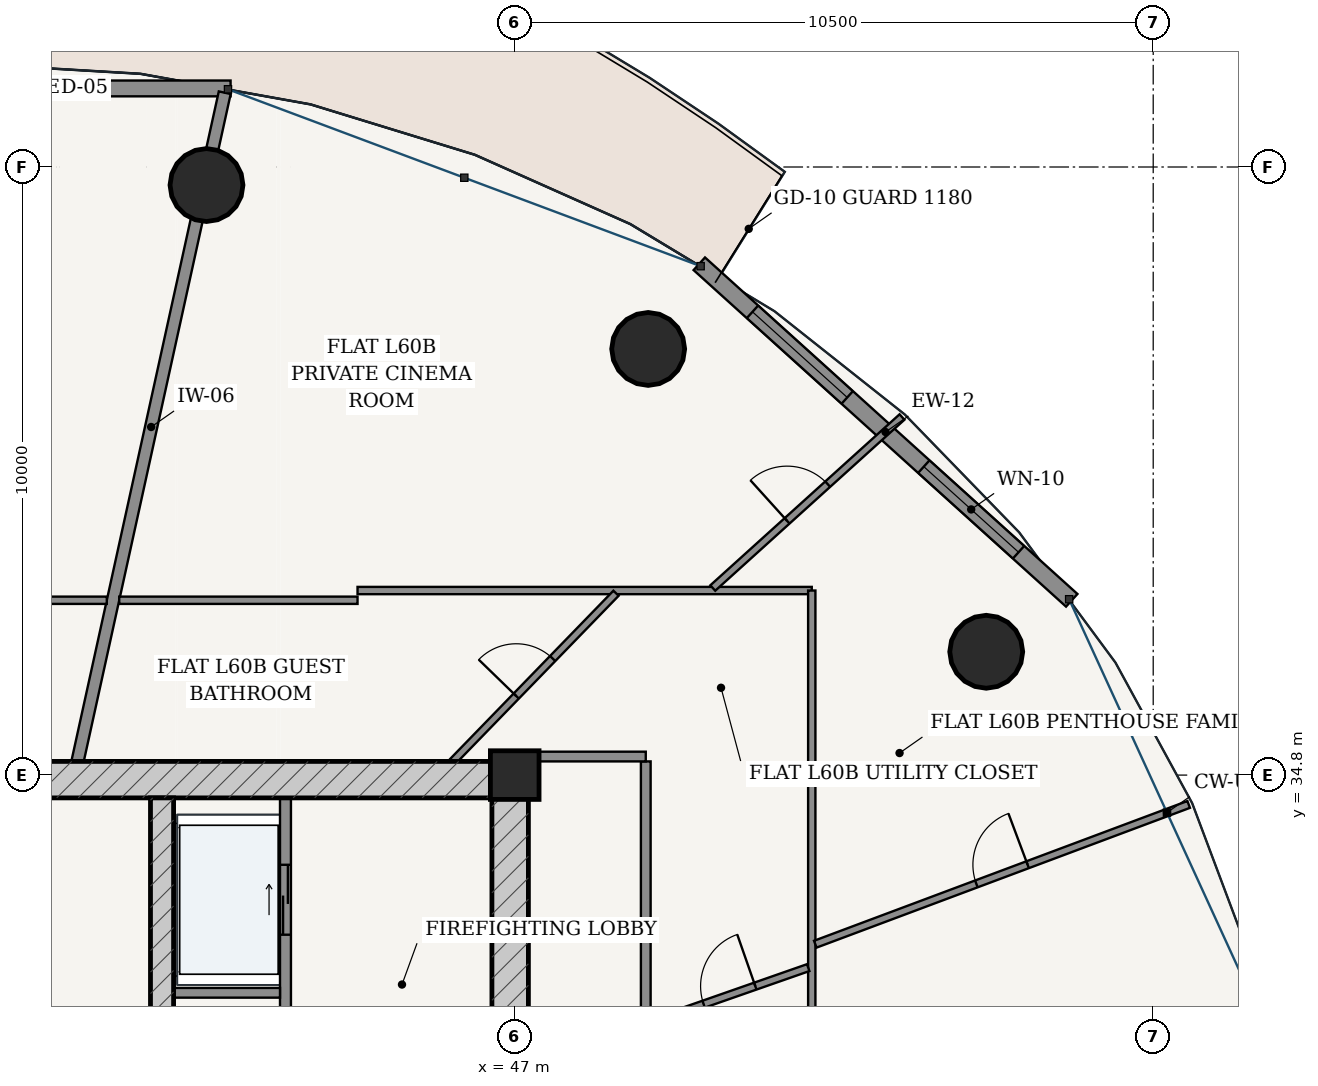
"""IFC4 building model, lengths in metres.
Left out: names, types, materials, properties, quantities, classifications, styles, units other than length and angle.
Written with IfcOpenShell. Run it as: python <this file> out.ifc"""

import sys

from ifc_helpers import new_model, si_unit, direction, frame, frame_2d, origin, origin_2d, place, context, subcontext, project, spatial, rectangle, hollow_circle, extrude, source, transform, mapped, element, fill, save


model = new_model("IFC4")
c1 = context("Model", 3, precision=1e-05, world=origin(), true_north=direction((-0.2419218956, 0.970295726276)))
c2 = subcontext(c1, "Body", "Model", "MODEL_VIEW")
j1 = project(units=[si_unit("LENGTHUNIT", "METRE"), si_unit("PLANEANGLEUNIT", "RADIAN")], contexts=[c1])
p1 = place(None, origin())
s1 = spatial("IfcSite", under=j1, at=p1, CompositionType="ELEMENT")
p2 = place(p1, origin())
s2 = spatial("IfcBuilding", under=s1, at=p2, CompositionType="ELEMENT")
p3 = place(p2, frame((0.0, 0.0, 228.2)))
s3 = spatial("IfcBuildingStorey", under=s2, at=p3, CompositionType="ELEMENT", Elevation=228.2)
p4 = place(p3, frame((47.0, 34.8, 0.0), z_axis=(0.0, 0.0, 1.0), x_axis=(1.0, 0.0, 0.0)))
e1 = element("IfcColumn", 1, at=p4, inside=s3, PredefinedType="COLUMN", context=c2, shape_type="SweptSolid", body=[
    extrude(rectangle(XDim=0.8, YDim=0.8, at=origin_2d()), origin(), (0.0, 0.0, 1.0), 3.7),
])
p5 = place(p3, frame((28.775, 34.725, 0.0), z_axis=(0.0, 0.0, 1.0), x_axis=(1.0, 0.0, 0.0)))
e2 = element("IfcWall", 2, at=p5, inside=s3, PredefinedType="SHEAR", context=c2, shape_type="SweptSolid", body=[
    extrude(rectangle(XDim=18.45, YDim=0.6, at=frame_2d((9.225, 0.0))), origin(), (0.0, 0.0, 1.0), 3.435),
])
p6 = place(p3, frame((46.925, 19.175, 0.0), z_axis=(0.0, 0.0, 1.0), x_axis=(0.0, 1.0, 0.0)))
e3 = element("IfcWall", 3, at=p6, inside=s3, PredefinedType="SHEAR", context=c2, shape_type="SweptSolid", body=[
    extrude(rectangle(XDim=15.25, YDim=0.6, at=frame_2d((7.625, 0.0))), origin(), (0.0, 0.0, 1.0), 3.435),
])
p7 = place(p6, frame((9.875, 0.0, 0.0)))
e4 = element("IfcOpeningElement", 4, at=p7, cuts=e3, PredefinedType="OPENING", context=c2, shape_type="SweptSolid", body=[
    extrude(rectangle(XDim=1.5, YDim=2.2, at=frame_2d((0.75, 1.1))), frame((0.0, 0.31, 0.0), z_axis=(0.0, -1.0, 0.0), x_axis=(1.0, 0.0, 0.0)), (0.0, 0.0, 1.0), 0.62),
])
p8 = place(p3, frame((41.2, 19.175, 0.0), z_axis=(0.0, 0.0, 1.0), x_axis=(0.0, 1.0, 0.0)))
e5 = element("IfcWall", 5, at=p8, inside=s3, PredefinedType="SHEAR", context=c2, shape_type="SweptSolid", body=[
    extrude(rectangle(XDim=15.25, YDim=0.38, at=frame_2d((7.625, 0.0))), origin(), (0.0, 0.0, 1.0), 3.435),
])
p9 = place(p8, frame((7.8, 0.0, 0.0)))
e6 = element("IfcOpeningElement", 6, at=p9, cuts=e5, PredefinedType="OPENING", context=c2, shape_type="SweptSolid", body=[
    extrude(rectangle(XDim=1.05, YDim=2.15, at=frame_2d((0.525, 1.075))), frame((0.0, 0.2, 0.0), z_axis=(0.0, -1.0, 0.0), x_axis=(1.0, 0.0, 0.0)), (0.0, 0.0, 1.0), 0.4),
])
for number, where, z_axis, x_axis in (
    (7, (54.754, 36.828, 0.0), (0.0, 0.0, 1.0), (1.0, 0.0, 0.0)),
    (8, (49.195, 41.808, 0.0), (0.0, 0.0, 1.0), (1.0, 0.0, 0.0)),
    (9, (41.931, 44.503, 0.0), (0.0, 0.0, 1.0), (1.0, 0.0, 0.0)),
):
    element("IfcColumn", number, at=place(p3, frame(where, z_axis=z_axis, x_axis=x_axis)), inside=s3, PredefinedType="COLUMN", context=c2, shape_type="SweptSolid", body=[
        extrude(hollow_circle(Radius=0.6, WallThickness=0.038, at=origin_2d()), origin(), (0.0, 0.0, 1.0), 3.7),
    ])
p10 = place(p3, frame((56.16, 37.674, 0.0), z_axis=(0.0, 0.0, 1.0), x_axis=(-0.741972126783, 0.670430729514, 0.0)))
e10 = element("IfcWall", 10, at=p10, inside=s3, PredefinedType="SOLIDWALL", context=c2, shape_type="SweptSolid", body=[
    extrude(rectangle(XDim=8.255, YDim=0.28, at=frame_2d((4.127, 0.0))), origin(), (0.0, 0.0, 1.0), 3.435),
])
p11 = place(p10, frame((1.179, 0.0, 0.85)))
e11 = element("IfcOpeningElement", 11, at=p11, cuts=e10, PredefinedType="OPENING", context=c2, shape_type="SweptSolid", body=[
    extrude(rectangle(XDim=2.1, YDim=1.95, at=frame_2d((1.05, 0.975))), frame((0.0, 0.15, 0.0), z_axis=(0.0, -1.0, 0.0), x_axis=(1.0, 0.0, 0.0)), (0.0, 0.0, 1.0), 0.3),
])
p12 = place(p10, frame((4.976, 0.0, 0.85)))
e12 = element("IfcOpeningElement", 12, at=p12, cuts=e10, PredefinedType="OPENING", context=c2, shape_type="SweptSolid", body=[
    extrude(rectangle(XDim=2.1, YDim=1.95, at=frame_2d((1.05, 0.975))), frame((0.0, 0.15, 0.0), z_axis=(0.0, -1.0, 0.0), x_axis=(1.0, 0.0, 0.0)), (0.0, 0.0, 1.0), 0.3),
])
p13 = place(p3, frame((42.327, 46.092, 0.0), z_axis=(0.0, 0.0, 1.0), x_axis=(-1.0, 0.0, 0.0)))
e13 = element("IfcWall", 13, at=p13, inside=s3, PredefinedType="SOLIDWALL", context=c2, shape_type="SweptSolid", body=[
    extrude(rectangle(XDim=8.654, YDim=0.26, at=frame_2d((4.327, 0.0))), origin(), (0.0, 0.0, 1.0), 3.435),
])
p14 = place(p13, frame((3.652, 0.0, 0.0)))
e14 = element("IfcOpeningElement", 14, at=p14, cuts=e13, PredefinedType="OPENING", context=c2, shape_type="SweptSolid", body=[
    extrude(rectangle(XDim=1.35, YDim=2.2, at=frame_2d((0.675, 1.1))), frame((0.0, 0.14, 0.0), z_axis=(0.0, -1.0, 0.0), x_axis=(1.0, 0.0, 0.0)), (0.0, 0.0, 1.0), 0.28),
])
p15 = place(p3, frame((43.23, 28.52, 0.0), z_axis=(0.0, 0.0, 1.0), x_axis=(0.0, 1.0, 0.0)))
e15 = element("IfcWall", 15, at=p15, inside=s3, PredefinedType="PARTITIONING", context=c2, shape_type="SweptSolid", body=[
    extrude(rectangle(XDim=5.905, YDim=0.18, at=frame_2d((2.953, 0.0))), origin(), (0.0, 0.0, 1.0), 3.435),
])
p16 = place(p15, frame((0.905, 0.0, 0.0)))
e16 = element("IfcOpeningElement", 16, at=p16, cuts=e15, PredefinedType="OPENING", context=c2, shape_type="SweptSolid", body=[
    extrude(rectangle(XDim=0.85, YDim=2.1, at=frame_2d((0.425, 1.05))), frame((0.0, 0.1, 0.0), z_axis=(0.0, -1.0, 0.0), x_axis=(1.0, 0.0, 0.0)), (0.0, 0.0, 1.0), 0.2),
])
p17 = place(p15, frame((3.655, 0.0, 0.0)))
e17 = element("IfcOpeningElement", 17, at=p17, cuts=e15, PredefinedType="OPENING", context=c2, shape_type="SweptSolid", body=[
    extrude(rectangle(XDim=1.15, YDim=2.2, at=frame_2d((0.575, 1.1))), frame((0.0, 0.1, 0.0), z_axis=(0.0, -1.0, 0.0), x_axis=(1.0, 0.0, 0.0)), (0.0, 0.0, 1.0), 0.2),
])
p18 = place(p3, frame((41.39, 31.22, 0.0), z_axis=(0.0, 0.0, 1.0), x_axis=(1.0, 0.0, 0.0)))
e18 = element("IfcWall", 18, at=p18, inside=s3, PredefinedType="PARTITIONING", context=c2, shape_type="SweptSolid", body=[
    extrude(rectangle(XDim=1.75, YDim=0.16, at=frame_2d((0.875, 0.0))), origin(), (0.0, 0.0, 1.0), 3.435),
])
p19 = place(p3, frame((49.155, 16.725, 0.0), z_axis=(0.0, 0.0, 1.0), x_axis=(0.0, 1.0, 0.0)))
e19 = element("IfcWall", 19, at=p19, inside=s3, PredefinedType="PARTITIONING", context=c2, shape_type="SweptSolid", body=[
    extrude(rectangle(XDim=18.3, YDim=0.16, at=frame_2d((9.15, 0.0))), origin(), (0.0, 0.0, 1.0), 2.951),
])
p20 = place(p3, frame((47.225, 35.105, 0.0), z_axis=(0.0, 0.0, 1.0), x_axis=(1.0, 0.0, 0.0)))
e20 = element("IfcWall", 20, at=p20, inside=s3, PredefinedType="PARTITIONING", context=c2, shape_type="SweptSolid", body=[
    extrude(rectangle(XDim=1.93, YDim=0.16, at=frame_2d((0.965, 0.0))), origin(), (0.0, 0.0, 1.0), 3.435),
])
p21 = place(p3, frame((39.811, 35.027, 0.0), z_axis=(0.0, 0.0, 1.0), x_axis=(0.214966857327, 0.976621344356, 0.0)))
e21 = element("IfcWall", 21, at=p21, inside=s3, PredefinedType="PARTITIONING", context=c2, shape_type="SweptSolid", body=[
    extrude(rectangle(XDim=11.258, YDim=0.2, at=frame_2d((5.629, 0.0))), origin(), (0.0, 0.0, 1.0), 2.52),
])
p22 = place(p3, frame((31.585, 37.675, 0.0), z_axis=(0.0, 0.0, 1.0), x_axis=(1.0, 0.0, 0.0)))
e22 = element("IfcWall", 22, at=p22, inside=s3, PredefinedType="PARTITIONING", context=c2, shape_type="SweptSolid", body=[
    extrude(rectangle(XDim=8.707, YDim=0.12, at=frame_2d((4.354, 0.0))), origin(), (0.0, 0.0, 1.0), 2.951),
])
p23 = place(p22, frame((1.327, 0.0, 0.0)))
e23 = element("IfcOpeningElement", 23, at=p23, cuts=e22, PredefinedType="OPENING", context=c2, shape_type="SweptSolid", body=[
    extrude(rectangle(XDim=0.9, YDim=2.15, at=frame_2d((0.45, 1.075))), frame((0.0, 0.07, 0.0), z_axis=(0.0, -1.0, 0.0), x_axis=(1.0, 0.0, 0.0)), (0.0, 0.0, 1.0), 0.14),
])
p24 = place(p3, frame((40.496, 37.675, 0.0), z_axis=(0.0, 0.0, 1.0), x_axis=(1.0, 0.0, 0.0)))
e24 = element("IfcWall", 24, at=p24, inside=s3, PredefinedType="PARTITIONING", context=c2, shape_type="SweptSolid", body=[
    extrude(rectangle(XDim=3.919, YDim=0.12, at=frame_2d((1.959, 0.0))), origin(), (0.0, 0.0, 1.0), 2.951),
])
p25 = place(p3, frame((44.415, 37.835, 0.0), z_axis=(0.0, 0.0, 1.0), x_axis=(1.0, 0.0, 0.0)))
e25 = element("IfcWall", 25, at=p25, inside=s3, PredefinedType="PARTITIONING", context=c2, shape_type="SweptSolid", body=[
    extrude(rectangle(XDim=7.47, YDim=0.12, at=frame_2d((3.735, 0.0))), origin(), (0.0, 0.0, 1.0), 2.951),
])
p26 = place(p3, frame((51.885, 37.835, 0.0), z_axis=(0.0, 0.0, 1.0), x_axis=(0.0, -1.0, 0.0)))
e26 = element("IfcWall", 26, at=p26, inside=s3, PredefinedType="PARTITIONING", context=c2, shape_type="SweptSolid", body=[
    extrude(rectangle(XDim=23.92, YDim=0.12, at=frame_2d((11.96, 0.0))), origin(), (0.0, 0.0, 1.0), 2.951),
])
p27 = place(p26, frame((16.558, 0.0, 0.0)))
e27 = element("IfcOpeningElement", 27, at=p27, cuts=e26, PredefinedType="OPENING", context=c2, shape_type="SweptSolid", body=[
    extrude(rectangle(XDim=0.9, YDim=2.15, at=frame_2d((0.45, 1.075))), frame((0.0, 0.07, 0.0), z_axis=(0.0, -1.0, 0.0), x_axis=(1.0, 0.0, 0.0)), (0.0, 0.0, 1.0), 0.14),
])
p28 = place(p3, frame((51.943, 32.019, 0.0), z_axis=(0.0, 0.0, 1.0), x_axis=(0.936540194592, 0.350560214389, 0.0)))
e28 = element("IfcWall", 28, at=p28, inside=s3, PredefinedType="PARTITIONING", context=c2, shape_type="SweptSolid", body=[
    extrude(rectangle(XDim=6.556, YDim=0.12, at=frame_2d((3.278, 0.0))), origin(), (0.0, 0.0, 1.0), 2.951),
])
p29 = place(p28, frame((2.828, 0.0, 0.0)))
e29 = element("IfcOpeningElement", 29, at=p29, cuts=e28, PredefinedType="OPENING", context=c2, shape_type="SweptSolid", body=[
    extrude(rectangle(XDim=0.9, YDim=2.15, at=frame_2d((0.45, 1.075))), frame((0.0, 0.07, 0.0), z_axis=(0.0, -1.0, 0.0), x_axis=(1.0, 0.0, 0.0)), (0.0, 0.0, 1.0), 0.14),
])
p30 = place(p3, frame((50.257, 37.876, 0.0), z_axis=(0.0, 0.0, 1.0), x_axis=(0.741943837234, 0.670462036502, 0.0)))
e30 = element("IfcWall", 30, at=p30, inside=s3, PredefinedType="PARTITIONING", context=c2, shape_type="SweptSolid", body=[
    extrude(rectangle(XDim=4.194, YDim=0.12, at=frame_2d((2.097, 0.0))), origin(), (0.0, 0.0, 1.0), 2.951),
])
p31 = place(p30, frame((1.647, 0.0, 0.0)))
e31 = element("IfcOpeningElement", 31, at=p31, cuts=e30, PredefinedType="OPENING", context=c2, shape_type="SweptSolid", body=[
    extrude(rectangle(XDim=0.9, YDim=2.15, at=frame_2d((0.45, 1.075))), frame((0.0, 0.07, 0.0), z_axis=(0.0, -1.0, 0.0), x_axis=(1.0, 0.0, 0.0)), (0.0, 0.0, 1.0), 0.14),
])
p32 = place(p3, frame((49.237, 30.729, 0.0), z_axis=(0.0, 0.0, 1.0), x_axis=(0.94398177501, 0.329997588549, 0.0)))
e32 = element("IfcWall", 32, at=p32, inside=s3, PredefinedType="PARTITIONING", context=c2, shape_type="SweptSolid", body=[
    extrude(rectangle(XDim=2.743, YDim=0.12, at=frame_2d((1.372, 0.0))), origin(), (0.0, 0.0, 1.0), 3.11),
])
p33 = place(p32, frame((0.922, 0.0, 0.0)))
e33 = element("IfcOpeningElement", 33, at=p33, cuts=e32, PredefinedType="OPENING", context=c2, shape_type="SweptSolid", body=[
    extrude(rectangle(XDim=0.9, YDim=2.15, at=frame_2d((0.45, 1.075))), frame((0.0, 0.07, 0.0), z_axis=(0.0, -1.0, 0.0), x_axis=(1.0, 0.0, 0.0)), (0.0, 0.0, 1.0), 0.14),
])
p34 = place(p3, frame((45.983, 35.026, 0.0), z_axis=(0.0, 0.0, 1.0), x_axis=(0.696410097703, 0.717644045344, 0.0)))
e34 = element("IfcWall", 34, at=p34, inside=s3, PredefinedType="PARTITIONING", context=c2, shape_type="SweptSolid", body=[
    extrude(rectangle(XDim=3.852, YDim=0.12, at=frame_2d((1.926, 0.0))), origin(), (0.0, 0.0, 1.0), 2.951),
])
p35 = place(p34, frame((1.496, 0.0, 0.0)))
e35 = element("IfcOpeningElement", 35, at=p35, cuts=e34, PredefinedType="OPENING", context=c2, shape_type="SweptSolid", body=[
    extrude(rectangle(XDim=0.86, YDim=2.15, at=frame_2d((0.43, 1.075))), frame((0.0, 0.07, 0.0), z_axis=(0.0, -1.0, 0.0), x_axis=(1.0, 0.0, 0.0)), (0.0, 0.0, 1.0), 0.14),
])
m1 = source(origin(), c2, "Body", "SweptSolid", [
    extrude(rectangle(XDim=2.1, YDim=1.95, at=frame_2d((1.05, 0.975))), frame((0.0, 0.03, 0.0), z_axis=(0.0, -1.0, 0.0), x_axis=(1.0, 0.0, 0.0)), (0.0, 0.0, 1.0), 0.06),
])
p36 = place(p11, origin())
e36 = element("IfcWindow", 36, at=p36, inside=s3, PartitioningType="SINGLE_PANEL", PredefinedType="WINDOW", context=c2, shape_type="MappedRepresentation", body=[
    mapped(m1, transform((0.0, 0.0, 0.0), scale=1.0)),
])
fill(e11, e36)
p37 = place(p12, origin())
e37 = element("IfcWindow", 37, at=p37, inside=s3, PartitioningType="SINGLE_PANEL", PredefinedType="WINDOW", context=c2, shape_type="MappedRepresentation", body=[
    mapped(m1, transform((0.0, 0.0, 0.0), scale=1.0)),
])
fill(e12, e37)
m2 = source(origin(), c2, "Body", "SweptSolid", [
    extrude(rectangle(XDim=1.15, YDim=2.2, at=frame_2d((0.575, 1.1))), frame((0.0, 0.025, 0.0), z_axis=(0.0, -1.0, 0.0), x_axis=(1.0, 0.0, 0.0)), (0.0, 0.0, 1.0), 0.05),
])
p38 = place(p17, origin())
e38 = element("IfcDoor", 38, at=p38, inside=s3, OperationType="DOUBLE_DOOR_SLIDING", PredefinedType="DOOR", context=c2, shape_type="MappedRepresentation", body=[
    mapped(m2, transform((0.0, 0.0, 0.0), scale=1.0)),
])
fill(e17, e38)
m3 = source(origin(), c2, "Body", "SweptSolid", [
    extrude(rectangle(XDim=0.9, YDim=2.15, at=frame_2d((0.45, 1.075))), frame((0.0, 0.025, 0.0), z_axis=(0.0, -1.0, 0.0), x_axis=(1.0, 0.0, 0.0)), (0.0, 0.0, 1.0), 0.05),
])
p39 = place(p33, origin())
e39 = element("IfcDoor", 39, at=p39, inside=s3, OperationType="SINGLE_SWING_RIGHT", PredefinedType="DOOR", context=c2, shape_type="MappedRepresentation", body=[
    mapped(m3, transform((0.0, 0.0, 0.0), scale=1.0)),
])
fill(e33, e39)
m4 = source(origin(), c2, "Body", "SweptSolid", [
    extrude(rectangle(XDim=0.86, YDim=2.15, at=frame_2d((0.43, 1.075))), frame((0.0, 0.025, 0.0), z_axis=(0.0, -1.0, 0.0), x_axis=(1.0, 0.0, 0.0)), (0.0, 0.0, 1.0), 0.05),
])
p40 = place(p35, origin())
e40 = element("IfcDoor", 40, at=p40, inside=s3, OperationType="SINGLE_SWING_LEFT", PredefinedType="DOOR", context=c2, shape_type="MappedRepresentation", body=[
    mapped(m4, transform((0.0, 0.0, 0.0), scale=1.0)),
])
fill(e35, e40)
p41 = place(p29, origin())
e41 = element("IfcDoor", 41, at=p41, inside=s3, OperationType="SINGLE_SWING_RIGHT", PredefinedType="DOOR", context=c2, shape_type="MappedRepresentation", body=[
    mapped(m3, transform((0.0, 0.0, 0.0), scale=1.0)),
])
fill(e29, e41)
p42 = place(p31, origin())
e42 = element("IfcDoor", 42, at=p42, inside=s3, OperationType="SINGLE_SWING_LEFT", PredefinedType="DOOR", context=c2, shape_type="MappedRepresentation", body=[
    mapped(m3, transform((0.0, 0.0, 0.0), scale=1.0)),
])
fill(e31, e42)
save(model, sys.argv[1])
